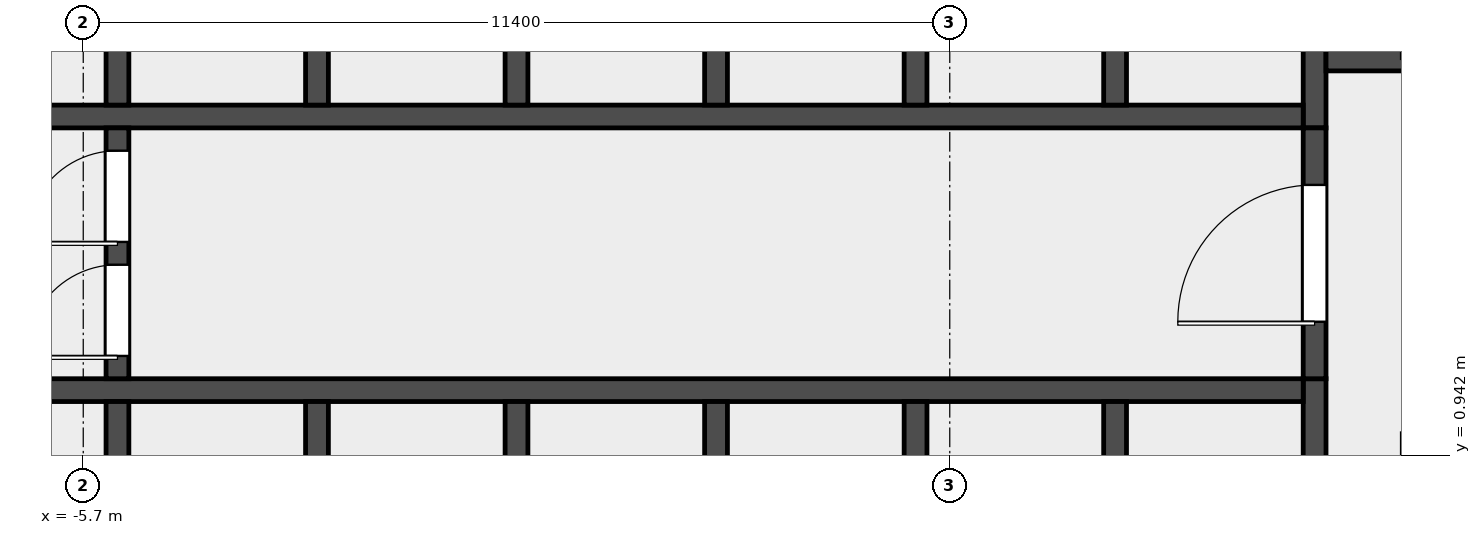
"""IFC4 building model, lengths in metres.
Left out: names, types, materials, properties, quantities, classifications, styles, units other than length and angle.
Written with IfcOpenShell. Run it as: python <this file> out.ifc"""

import sys

from ifc_helpers import new_model, si_unit, direction, frame, frame_2d, origin, place, context, subcontext, project, spatial, rectangle, extrude, element, fill, save


model = new_model("IFC4")
c1 = context("Model", 3, precision=1e-05, world=origin(), true_north=direction((0.0, 1.0)))
c2 = subcontext(c1, "Body", "Model", "MODEL_VIEW")
j1 = project(units=[si_unit("LENGTHUNIT", "METRE"), si_unit("PLANEANGLEUNIT", "RADIAN")], contexts=[c1])
p1 = place(None, origin())
s1 = spatial("IfcSite", under=j1, at=p1, CompositionType="ELEMENT")
p2 = place(p1, origin())
s2 = spatial("IfcBuilding", under=s1, at=p2, CompositionType="ELEMENT")
p3 = place(p2, frame((0.0, 0.0, 205.0)))
s3 = spatial("IfcBuildingStorey", under=s2, at=p3, CompositionType="ELEMENT", Elevation=205.0)
p4 = place(p3, frame((10.5, -6.6, 0.0), z_axis=(0.0, 0.0, 1.0), x_axis=(0.0, 1.0, 0.0)))
e1 = element("IfcWall", 1, at=p4, inside=s3, PredefinedType="SHEAR", context=c2, shape_type="SweptSolid", body=[
    extrude(rectangle(XDim=8.55, YDim=0.3, at=frame_2d((4.275, 0.0))), origin(), (0.0, 0.0, 1.0), 5.7),
])
p5 = place(p3, frame((10.5, 5.25, 0.0), z_axis=(0.0, 0.0, 1.0), x_axis=(0.0, 1.0, 0.0)))
e2 = element("IfcWall", 2, at=p5, inside=s3, PredefinedType="SHEAR", context=c2, shape_type="SweptSolid", body=[
    extrude(rectangle(XDim=7.65, YDim=0.3, at=frame_2d((3.825, 0.0))), origin(), (0.0, 0.0, 1.0), 5.7),
])
p6 = place(p3, frame((10.65, 6.15, 0.0), z_axis=(0.0, 0.0, 1.0), x_axis=(1.0, 0.0, 0.0)))
e3 = element("IfcWall", 3, at=p6, inside=s3, PredefinedType="SOLIDWALL", context=c2, shape_type="SweptSolid", body=[
    extrude(rectangle(XDim=3.15, YDim=0.3, at=frame_2d((1.575, 0.0))), origin(), (0.0, 0.0, 1.0), 5.7),
])
p7 = place(p6, frame((1.025, 0.0, 0.0)))
e4 = element("IfcOpeningElement", 4, at=p7, cuts=e3, PredefinedType="OPENING", context=c2, shape_type="SweptSolid", body=[
    extrude(rectangle(XDim=1.1, YDim=2.1, at=frame_2d((0.55, 1.05))), frame((0.0, 0.162, 0.0), z_axis=(0.0, -1.0, 0.0), x_axis=(1.0, 0.0, 0.0)), (0.0, 0.0, 1.0), 0.324),
])
p8 = place(p3, frame((-10.35, 1.8, 0.0), z_axis=(0.0, 0.0, 1.0), x_axis=(1.0, 0.0, 0.0)))
e5 = element("IfcWall", 5, at=p8, inside=s3, PredefinedType="SOLIDWALL", context=c2, shape_type="SweptSolid", body=[
    extrude(rectangle(XDim=20.7, YDim=0.3, at=frame_2d((10.35, 0.0))), origin(), (0.0, 0.0, 1.0), 5.7),
])
p9 = place(p8, frame((0.512, 0.0, 0.0)))
e6 = element("IfcOpeningElement", 6, at=p9, cuts=e5, PredefinedType="OPENING", context=c2, shape_type="SweptSolid", body=[
    extrude(rectangle(XDim=1.3, YDim=2.1, at=frame_2d((0.65, 1.05))), frame((0.0, 0.162, 0.0), z_axis=(0.0, -1.0, 0.0), x_axis=(1.0, 0.0, 0.0)), (0.0, 0.0, 1.0), 0.324),
])
p10 = place(p3, frame((-10.35, 5.4, 0.0), z_axis=(0.0, 0.0, 1.0), x_axis=(1.0, 0.0, 0.0)))
e7 = element("IfcWall", 7, at=p10, inside=s3, PredefinedType="SOLIDWALL", context=c2, shape_type="SweptSolid", body=[
    extrude(rectangle(XDim=20.7, YDim=0.3, at=frame_2d((10.35, 0.0))), origin(), (0.0, 0.0, 1.0), 5.7),
])
p11 = place(p10, frame((0.512, 0.0, 0.0)))
e8 = element("IfcOpeningElement", 8, at=p11, cuts=e7, PredefinedType="OPENING", context=c2, shape_type="SweptSolid", body=[
    extrude(rectangle(XDim=1.3, YDim=2.1, at=frame_2d((0.65, 1.05))), frame((0.0, 0.162, 0.0), z_axis=(0.0, -1.0, 0.0), x_axis=(1.0, 0.0, 0.0)), (0.0, 0.0, 1.0), 0.324),
])
for number, where, z_axis, x_axis in (
    (9, (-5.25, -1.05, 0.0), (0.0, 0.0, 1.0), (0.0, 1.0, 0.0)),
    (10, (-2.625, -1.05, 0.0), (0.0, 0.0, 1.0), (0.0, 1.0, 0.0)),
    (11, (0.0, -1.05, 0.0), (0.0, 0.0, 1.0), (0.0, 1.0, 0.0)),
    (12, (2.625, -1.05, 0.0), (0.0, 0.0, 1.0), (0.0, 1.0, 0.0)),
    (13, (5.25, -1.05, 0.0), (0.0, 0.0, 1.0), (0.0, 1.0, 0.0)),
    (14, (7.875, -1.05, 0.0), (0.0, 0.0, 1.0), (0.0, 1.0, 0.0)),
    (15, (-5.25, 5.55, 0.0), (0.0, 0.0, 1.0), (0.0, 1.0, 0.0)),
    (16, (-2.625, 5.55, 0.0), (0.0, 0.0, 1.0), (0.0, 1.0, 0.0)),
    (17, (0.0, 5.55, 0.0), (0.0, 0.0, 1.0), (0.0, 1.0, 0.0)),
    (18, (2.625, 5.55, 0.0), (0.0, 0.0, 1.0), (0.0, 1.0, 0.0)),
    (19, (5.25, 5.55, 0.0), (0.0, 0.0, 1.0), (0.0, 1.0, 0.0)),
    (20, (7.875, 5.55, 0.0), (0.0, 0.0, 1.0), (0.0, 1.0, 0.0)),
):
    element("IfcWall", number, at=place(p3, frame(where, z_axis=z_axis, x_axis=x_axis)), inside=s3, PredefinedType="SOLIDWALL", context=c2, shape_type="SweptSolid", body=[
        extrude(rectangle(XDim=2.7, YDim=0.3, at=frame_2d((1.35, 0.0))), origin(), (0.0, 0.0, 1.0), 5.7),
    ])
p12 = place(p3, frame((-5.25, 1.95, 0.0), z_axis=(0.0, 0.0, 1.0), x_axis=(0.0, 1.0, 0.0)))
e21 = element("IfcWall", 21, at=p12, inside=s3, PredefinedType="SOLIDWALL", context=c2, shape_type="SweptSolid", body=[
    extrude(rectangle(XDim=3.3, YDim=0.3, at=frame_2d((1.65, 0.0))), origin(), (0.0, 0.0, 1.0), 5.7),
])
p13 = place(p12, frame((0.3, 0.0, 0.0)))
e22 = element("IfcOpeningElement", 22, at=p13, cuts=e21, PredefinedType="OPENING", context=c2, shape_type="SweptSolid", body=[
    extrude(rectangle(XDim=1.2, YDim=2.1, at=frame_2d((0.6, 1.05))), frame((0.0, 0.162, 0.0), z_axis=(0.0, -1.0, 0.0), x_axis=(1.0, 0.0, 0.0)), (0.0, 0.0, 1.0), 0.324),
])
p14 = place(p12, frame((1.8, 0.0, 0.0)))
e23 = element("IfcOpeningElement", 23, at=p14, cuts=e21, PredefinedType="OPENING", context=c2, shape_type="SweptSolid", body=[
    extrude(rectangle(XDim=1.2, YDim=2.1, at=frame_2d((0.6, 1.05))), frame((0.0, 0.162, 0.0), z_axis=(0.0, -1.0, 0.0), x_axis=(1.0, 0.0, 0.0)), (0.0, 0.0, 1.0), 0.324),
])
p15 = place(p3, frame((10.5, 1.95, 0.0), z_axis=(0.0, 0.0, 1.0), x_axis=(0.0, 1.0, 0.0)))
e24 = element("IfcWall", 24, at=p15, inside=s3, PredefinedType="SOLIDWALL", context=c2, shape_type="SweptSolid", body=[
    extrude(rectangle(XDim=3.3, YDim=0.3, at=frame_2d((1.65, 0.0))), origin(), (0.0, 0.0, 1.0), 5.7),
])
p16 = place(p15, frame((0.75, 0.0, 0.0)))
e25 = element("IfcOpeningElement", 25, at=p16, cuts=e24, PredefinedType="OPENING", context=c2, shape_type="SweptSolid", body=[
    extrude(rectangle(XDim=1.8, YDim=2.1, at=frame_2d((0.9, 1.05))), frame((0.0, 0.162, 0.0), z_axis=(0.0, -1.0, 0.0), x_axis=(1.0, 0.0, 0.0)), (0.0, 0.0, 1.0), 0.324),
])
p17 = place(p13, origin())
e26 = element("IfcDoor", 26, at=p17, inside=s3, OperationType="SINGLE_SWING_LEFT", PredefinedType="DOOR", context=c2, shape_type="SweptSolid", body=[
    extrude(rectangle(XDim=1.2, YDim=2.1, at=frame_2d((0.6, 1.05))), frame((0.0, 0.025, 0.0), z_axis=(0.0, -1.0, 0.0), x_axis=(1.0, 0.0, 0.0)), (0.0, 0.0, 1.0), 0.05),
])
fill(e22, e26)
p18 = place(p14, origin())
e27 = element("IfcDoor", 27, at=p18, inside=s3, OperationType="SINGLE_SWING_RIGHT", PredefinedType="DOOR", context=c2, shape_type="SweptSolid", body=[
    extrude(rectangle(XDim=1.2, YDim=2.1, at=frame_2d((0.6, 1.05))), frame((0.0, 0.025, 0.0), z_axis=(0.0, -1.0, 0.0), x_axis=(1.0, 0.0, 0.0)), (0.0, 0.0, 1.0), 0.05),
])
fill(e23, e27)
p19 = place(p16, origin())
e28 = element("IfcDoor", 28, at=p19, inside=s3, OperationType="DOUBLE_DOOR_SINGLE_SWING", PredefinedType="DOOR", context=c2, shape_type="SweptSolid", body=[
    extrude(rectangle(XDim=1.8, YDim=2.1, at=frame_2d((0.9, 1.05))), frame((0.0, 0.025, 0.0), z_axis=(0.0, -1.0, 0.0), x_axis=(1.0, 0.0, 0.0)), (0.0, 0.0, 1.0), 0.05),
])
fill(e25, e28)
save(model, sys.argv[1])
